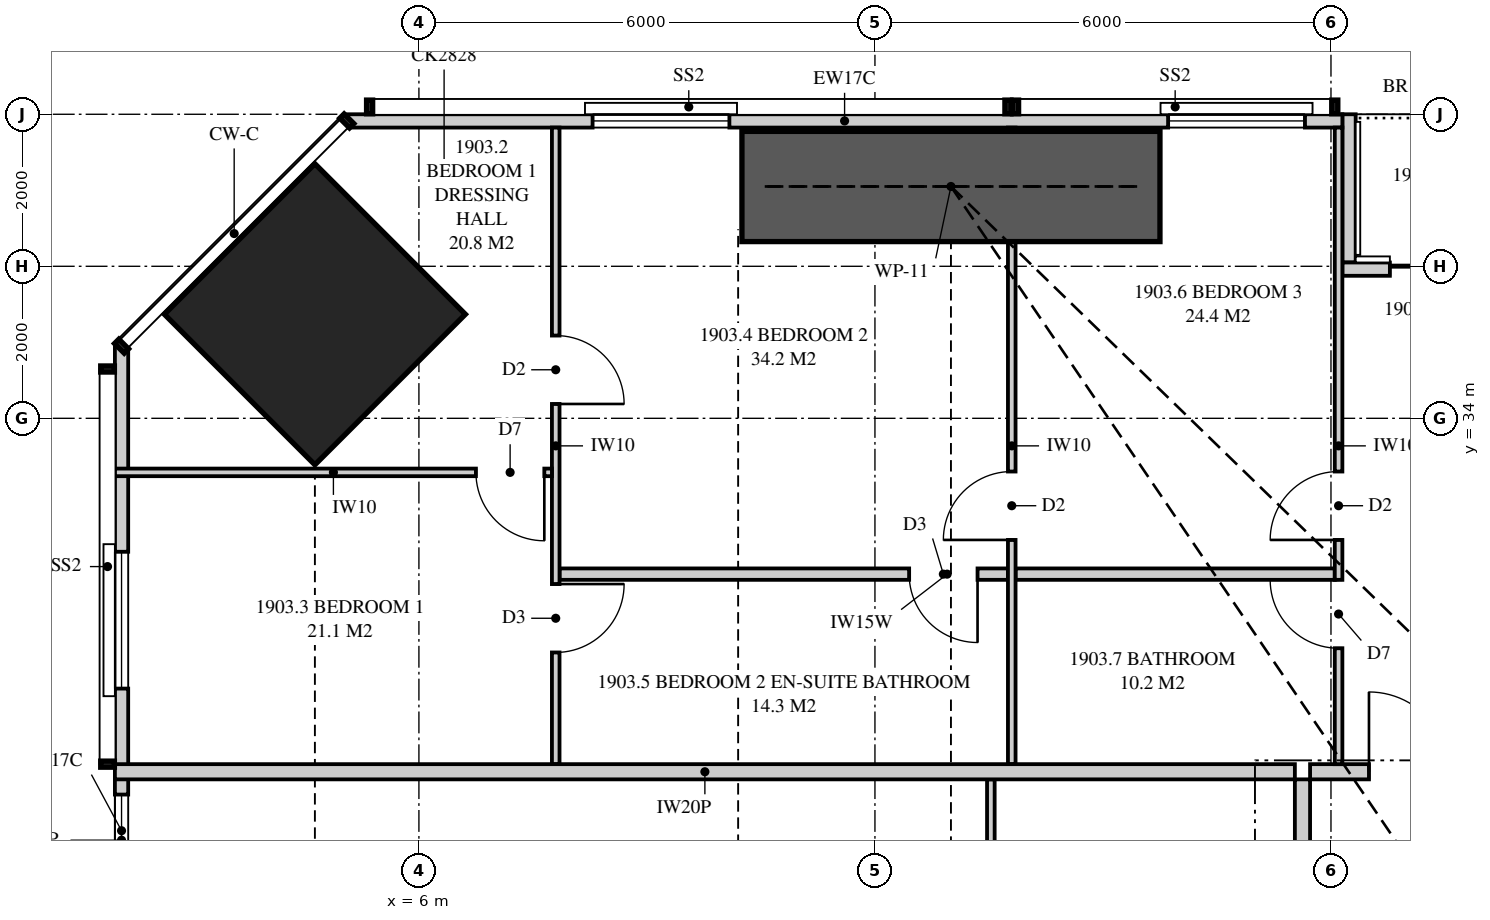
"""IFC4 building model, lengths in metres.
Left out: names, types, materials, properties, quantities, classifications, styles, units other than length and angle.
Written with IfcOpenShell. Run it as: python <this file> out.ifc"""

import sys

from ifc_helpers import new_model, si_unit, direction, frame, frame_2d, origin, origin_2d, place, context, subcontext, project, spatial, polyline, rectangle, hollow_rectangle, outline, extrude, element, fill, save


model = new_model("IFC4")
c1 = context("Model", 3, precision=1e-05, world=origin(), true_north=direction((0.0, 1.0)))
c2 = subcontext(c1, "Body", "Model", "MODEL_VIEW")
j1 = project(units=[si_unit("LENGTHUNIT", "METRE"), si_unit("PLANEANGLEUNIT", "RADIAN")], contexts=[c1])
p1 = place(None, origin())
s1 = spatial("IfcSite", under=j1, at=p1, CompositionType="ELEMENT")
p2 = place(p1, origin())
s2 = spatial("IfcBuilding", under=s1, at=p2, CompositionType="ELEMENT")
p3 = place(p2, frame((0.0, 0.0, 71.25)))
s3 = spatial("IfcBuildingStorey", under=s2, at=p3, CompositionType="ELEMENT", Elevation=71.25)
p4 = place(p3, frame((4.631, 35.369, 0.0), z_axis=(0.0, 0.0, 1.0), x_axis=(0.707106781187, -0.707106781187, 0.0)))
e1 = element("IfcColumn", 1, at=p4, inside=s3, PredefinedType="COLUMN", context=c2, shape_type="SweptSolid", body=[
    extrude(hollow_rectangle(XDim=2.8, YDim=2.8, WallThickness=0.175, at=origin_2d()), origin(), (0.0, 0.0, 1.0), 3.5),
])
p5 = place(p3, frame((18.15, 37.913, 0.0), z_axis=(0.0, 0.0, 1.0), x_axis=(-1.0, 0.0, 0.0)))
e2 = element("IfcWall", 2, at=p5, inside=s3, PredefinedType="SOLIDWALL", context=c2, shape_type="SweptSolid", body=[
    extrude(rectangle(XDim=13.099, YDim=0.175, at=frame_2d((6.549, 0.0))), origin(), (0.0, 0.0, 1.0), 3.22),
])
p6 = place(p5, frame((0.492, 0.0, 0.4)))
e3 = element("IfcOpeningElement", 3, at=p6, cuts=e2, PredefinedType="OPENING", context=c2, shape_type="SweptSolid", body=[
    extrude(rectangle(XDim=1.8, YDim=1.85, at=frame_2d((0.9, 0.925))), frame((0.0, 0.097, 0.0), z_axis=(0.0, -1.0, 0.0), x_axis=(1.0, 0.0, 0.0)), (0.0, 0.0, 1.0), 0.195),
])
p7 = place(p5, frame((8.065, 0.0, 0.4)))
e4 = element("IfcOpeningElement", 4, at=p7, cuts=e2, PredefinedType="OPENING", context=c2, shape_type="SweptSolid", body=[
    extrude(rectangle(XDim=1.8, YDim=1.85, at=frame_2d((0.9, 0.925))), frame((0.0, 0.097, 0.0), z_axis=(0.0, -1.0, 0.0), x_axis=(1.0, 0.0, 0.0)), (0.0, 0.0, 1.0), 0.195),
])
p8 = place(p3, frame((21.2, 35.962, 0.0), z_axis=(0.0, 0.0, 1.0), x_axis=(-1.0, 0.0, 0.0)))
e5 = element("IfcWall", 5, at=p8, inside=s3, PredefinedType="SOLIDWALL", context=c2, shape_type="SweptSolid", body=[
    extrude(rectangle(XDim=3.05, YDim=0.175, at=frame_2d((1.525, 0.0))), origin(), (0.0, 0.0, 1.0), 3.22),
])
p9 = place(p8, frame((0.625, 0.0, 0.0)))
e6 = element("IfcOpeningElement", 6, at=p9, cuts=e5, PredefinedType="OPENING", context=c2, shape_type="SweptSolid", body=[
    extrude(rectangle(XDim=1.8, YDim=2.25, at=frame_2d((0.9, 1.125))), frame((0.0, 0.097, 0.0), z_axis=(0.0, -1.0, 0.0), x_axis=(1.0, 0.0, 0.0)), (0.0, 0.0, 1.0), 0.195),
])
p10 = place(p3, frame((18.238, 38.0, 0.0), z_axis=(0.0, 0.0, 1.0), x_axis=(0.0, -1.0, 0.0)))
e7 = element("IfcWall", 7, at=p10, inside=s3, PredefinedType="SOLIDWALL", context=c2, shape_type="SweptSolid", body=[
    extrude(outline(polyline([(0.0, 0.0), (1.95, 0.0), (1.95, 3.22), (1.65, 3.22), (1.65, 2.1), (0.25, 2.1), (0.25, 3.22), (0.0, 3.22), (0.0, 0.0)])), frame((0.0, 0.087, 0.0), z_axis=(0.0, -1.0, 0.0), x_axis=(1.0, 0.0, 0.0)), (0.0, 0.0, 1.0), 0.175),
])
p11 = place(p3, frame((2.087, 34.949, 0.0), z_axis=(0.0, 0.0, 1.0), x_axis=(0.0, -1.0, 0.0)))
e8 = element("IfcWall", 8, at=p11, inside=s3, PredefinedType="SOLIDWALL", context=c2, shape_type="SweptSolid", body=[
    extrude(rectangle(XDim=12.749, YDim=0.175, at=frame_2d((6.375, 0.0))), origin(), (0.0, 0.0, 1.0), 3.22),
])
p12 = place(p11, frame((2.704, 0.0, 0.4)))
e9 = element("IfcOpeningElement", 9, at=p12, cuts=e8, PredefinedType="OPENING", context=c2, shape_type="SweptSolid", body=[
    extrude(rectangle(XDim=1.8, YDim=1.85, at=frame_2d((0.9, 0.925))), frame((0.0, 0.097, 0.0), z_axis=(0.0, -1.0, 0.0), x_axis=(1.0, 0.0, 0.0)), (0.0, 0.0, 1.0), 0.195),
])
p13 = place(p11, frame((5.899, 0.0, 0.4)))
e10 = element("IfcOpeningElement", 10, at=p13, cuts=e8, PredefinedType="OPENING", context=c2, shape_type="SweptSolid", body=[
    extrude(rectangle(XDim=1.2, YDim=1.85, at=frame_2d((0.6, 0.925))), frame((0.0, 0.097, 0.0), z_axis=(0.0, -1.0, 0.0), x_axis=(1.0, 0.0, 0.0)), (0.0, 0.0, 1.0), 0.195),
])
p14 = place(p3, frame((17.725, 29.35, 0.0), z_axis=(0.0, 0.0, 1.0), x_axis=(1.0, 0.0, 0.0)))
e11 = element("IfcWall", 11, at=p14, inside=s3, PredefinedType="PARTITIONING", context=c2, shape_type="SweptSolid", body=[
    extrude(outline(polyline([(0.0, 0.0), (7.075, 0.0), (7.075, 3.22), (6.564, 3.22), (6.564, 2.694), (5.986, 2.694), (5.986, 3.22), (3.641, 3.22), (3.641, 2.641), (2.757, 2.641), (2.757, 3.22), (0.862, 3.22), (0.862, 2.641), (0.155, 2.641), (0.155, 3.22), (0.0, 3.22), (0.0, 0.0)])), frame((0.0, 0.1, 0.0), z_axis=(0.0, -1.0, 0.0), x_axis=(1.0, 0.0, 0.0)), (0.0, 0.0, 1.0), 0.2),
])
p15 = place(p14, frame((0.775, 0.0, 0.0)))
e12 = element("IfcOpeningElement", 12, at=p15, cuts=e11, PredefinedType="OPENING", context=c2, shape_type="SweptSolid", body=[
    extrude(rectangle(XDim=1.05, YDim=2.2, at=frame_2d((0.525, 1.1))), frame((0.0, 0.11, 0.0), z_axis=(0.0, -1.0, 0.0), x_axis=(1.0, 0.0, 0.0)), (0.0, 0.0, 1.0), 0.22),
])
p16 = place(p3, frame((7.8, 37.825, 0.0), z_axis=(0.0, 0.0, 1.0), x_axis=(0.0, -1.0, 0.0)))
e13 = element("IfcWall", 13, at=p16, inside=s3, PredefinedType="PARTITIONING", context=c2, shape_type="SweptSolid", body=[
    extrude(outline(polyline([(0.0, 0.0), (8.375, 0.0), (8.375, 3.22), (2.544, 3.22), (2.544, 2.1), (1.096, 2.1), (1.096, 3.22), (0.0, 3.22), (0.0, 0.0)])), frame((0.0, 0.05, 0.0), z_axis=(0.0, -1.0, 0.0), x_axis=(1.0, 0.0, 0.0)), (0.0, 0.0, 1.0), 0.1),
])
p17 = place(p16, frame((2.736, 0.0, 0.0)))
e14 = element("IfcOpeningElement", 14, at=p17, cuts=e13, PredefinedType="OPENING", context=c2, shape_type="SweptSolid", body=[
    extrude(rectangle(XDim=0.9, YDim=2.1, at=frame_2d((0.45, 1.05))), frame((0.0, 0.06, 0.0), z_axis=(0.0, -1.0, 0.0), x_axis=(1.0, 0.0, 0.0)), (0.0, 0.0, 1.0), 0.12),
])
p18 = place(p16, frame((6.006, 0.0, 0.0)))
e15 = element("IfcOpeningElement", 15, at=p18, cuts=e13, PredefinedType="OPENING", context=c2, shape_type="SweptSolid", body=[
    extrude(rectangle(XDim=0.9, YDim=2.1, at=frame_2d((0.45, 1.05))), frame((0.0, 0.06, 0.0), z_axis=(0.0, -1.0, 0.0), x_axis=(1.0, 0.0, 0.0)), (0.0, 0.0, 1.0), 0.12),
])
p19 = place(p3, frame((13.8, 37.825, 0.0), z_axis=(0.0, 0.0, 1.0), x_axis=(0.0, -1.0, 0.0)))
e16 = element("IfcWall", 16, at=p19, inside=s3, PredefinedType="PARTITIONING", context=c2, shape_type="SweptSolid", body=[
    extrude(outline(polyline([(8.375, 0.0), (8.375, 3.22), (2.446, 3.22), (2.446, 2.641), (1.485, 2.641), (1.485, 2.319), (1.475, 2.319), (1.475, 2.1), (1.021, 2.1), (1.021, 1.32), (0.529, 1.32), (0.529, 2.1), (0.075, 2.1), (0.075, 2.319), (0.0, 2.319), (0.0, 0.0), (8.375, 0.0)]), holes=[polyline([(0.529, 0.177), (0.529, 0.98), (1.021, 0.98), (1.021, 0.177), (0.529, 0.177)])]), frame((0.0, 0.05, 0.0), z_axis=(0.0, -1.0, 0.0), x_axis=(1.0, 0.0, 0.0)), (0.0, 0.0, 1.0), 0.1),
])
p20 = place(p19, frame((4.525, 0.0, 0.0)))
e17 = element("IfcOpeningElement", 17, at=p20, cuts=e16, PredefinedType="OPENING", context=c2, shape_type="SweptSolid", body=[
    extrude(rectangle(XDim=0.9, YDim=2.1, at=frame_2d((0.45, 1.05))), frame((0.0, 0.06, 0.0), z_axis=(0.0, -1.0, 0.0), x_axis=(1.0, 0.0, 0.0)), (0.0, 0.0, 1.0), 0.12),
])
p21 = place(p3, frame((18.1, 37.825, 0.0), z_axis=(0.0, 0.0, 1.0), x_axis=(0.0, -1.0, 0.0)))
e18 = element("IfcWall", 18, at=p21, inside=s3, PredefinedType="PARTITIONING", context=c2, shape_type="SweptSolid", body=[
    extrude(outline(polyline([(0.0, 0.0), (8.375, 0.0), (8.375, 2.641), (7.785, 2.641), (7.785, 3.22), (6.109, 3.22), (6.109, 2.641), (5.353, 2.641), (5.353, 3.22), (1.475, 3.22), (1.475, 2.1), (0.075, 2.1), (0.075, 3.22), (0.0, 3.22), (0.0, 0.0)])), frame((0.0, 0.05, 0.0), z_axis=(0.0, -1.0, 0.0), x_axis=(1.0, 0.0, 0.0)), (0.0, 0.0, 1.0), 0.1),
])
p22 = place(p21, frame((4.525, 0.0, 0.0)))
e19 = element("IfcOpeningElement", 19, at=p22, cuts=e18, PredefinedType="OPENING", context=c2, shape_type="SweptSolid", body=[
    extrude(rectangle(XDim=0.9, YDim=2.1, at=frame_2d((0.45, 1.05))), frame((0.0, 0.06, 0.0), z_axis=(0.0, -1.0, 0.0), x_axis=(1.0, 0.0, 0.0)), (0.0, 0.0, 1.0), 0.12),
])
p23 = place(p21, frame((5.95, 0.0, 0.0)))
e20 = element("IfcOpeningElement", 20, at=p23, cuts=e18, PredefinedType="OPENING", context=c2, shape_type="SweptSolid", body=[
    extrude(rectangle(XDim=0.9, YDim=2.1, at=frame_2d((0.45, 1.05))), frame((0.0, 0.06, 0.0), z_axis=(0.0, -1.0, 0.0), x_axis=(1.0, 0.0, 0.0)), (0.0, 0.0, 1.0), 0.12),
])
p24 = place(p3, frame((2.0, 33.289, 0.0), z_axis=(0.0, 0.0, 1.0), x_axis=(1.0, 0.0, 0.0)))
e21 = element("IfcWall", 21, at=p24, inside=s3, PredefinedType="PARTITIONING", context=c2, shape_type="SweptSolid", body=[
    extrude(outline(polyline([(0.0, 0.0), (5.75, 0.0), (5.75, 3.22), (3.011, 3.22), (3.011, 2.1), (1.577, 2.1), (1.577, 3.22), (0.0, 3.22), (0.0, 0.0)])), frame((0.0, 0.05, 0.0), z_axis=(0.0, -1.0, 0.0), x_axis=(1.0, 0.0, 0.0)), (0.0, 0.0, 1.0), 0.1),
])
p25 = place(p24, frame((4.75, 0.0, 0.0)))
e22 = element("IfcOpeningElement", 22, at=p25, cuts=e21, PredefinedType="OPENING", context=c2, shape_type="SweptSolid", body=[
    extrude(rectangle(XDim=0.9, YDim=2.1, at=frame_2d((0.45, 1.05))), frame((0.0, 0.06, 0.0), z_axis=(0.0, -1.0, 0.0), x_axis=(1.0, 0.0, 0.0)), (0.0, 0.0, 1.0), 0.12),
])
p26 = place(p3, frame((7.85, 31.95, 0.0), z_axis=(0.0, 0.0, 1.0), x_axis=(1.0, 0.0, 0.0)))
e23 = element("IfcWall", 23, at=p26, inside=s3, PredefinedType="PLUMBINGWALL", context=c2, shape_type="SweptSolid", body=[
    extrude(outline(polyline([(0.0, 0.0), (5.9, 0.0), (5.9, 3.22), (5.474, 3.22), (5.474, 2.621), (4.826, 2.621), (4.826, 3.22), (3.635, 3.22), (3.635, 2.62), (1.065, 2.62), (1.065, 3.22), (0.0, 3.22), (0.0, 0.0)])), frame((0.0, 0.075, 0.0), z_axis=(0.0, -1.0, 0.0), x_axis=(1.0, 0.0, 0.0)), (0.0, 0.0, 1.0), 0.15),
])
p27 = place(p26, frame((4.6, 0.0, 0.0)))
e24 = element("IfcOpeningElement", 24, at=p27, cuts=e23, PredefinedType="OPENING", context=c2, shape_type="SweptSolid", body=[
    extrude(rectangle(XDim=0.9, YDim=2.1, at=frame_2d((0.45, 1.05))), frame((0.0, 0.085, 0.0), z_axis=(0.0, -1.0, 0.0), x_axis=(1.0, 0.0, 0.0)), (0.0, 0.0, 1.0), 0.17),
])
p28 = place(p3, frame((13.85, 31.95, 0.0), z_axis=(0.0, 0.0, 1.0), x_axis=(1.0, 0.0, 0.0)))
e25 = element("IfcWall", 25, at=p28, inside=s3, PredefinedType="PLUMBINGWALL", context=c2, shape_type="SweptSolid", body=[
    extrude(outline(polyline([(0.0, 0.0), (4.2, 0.0), (4.2, 2.641), (3.982, 2.641), (3.982, 3.22), (2.953, 3.22), (2.953, 2.641), (2.28, 2.641), (2.28, 3.22), (0.0, 3.22), (0.0, 0.0)])), frame((0.0, 0.075, 0.0), z_axis=(0.0, -1.0, 0.0), x_axis=(1.0, 0.0, 0.0)), (0.0, 0.0, 1.0), 0.15),
])
p29 = place(p3, frame((2.0, 29.35, 0.0), z_axis=(0.0, 0.0, 1.0), x_axis=(1.0, 0.0, 0.0)))
e26 = element("IfcWall", 26, at=p29, inside=s3, PredefinedType="PARTITIONING", context=c2, shape_type="SweptSolid", body=[
    extrude(outline(polyline([(0.0, 0.0), (15.525, 0.0), (15.525, 3.22), (11.349, 3.22), (11.349, 2.621), (10.651, 2.621), (10.651, 3.22), (9.51, 3.22), (9.51, 2.62), (6.89, 2.62), (6.89, 3.22), (2.98, 3.22), (2.98, 2.621), (2.381, 2.621), (2.381, 2.1), (0.93, 2.1), (0.93, 3.22), (0.0, 3.22), (0.0, 0.0)])), frame((0.0, 0.1, 0.0), z_axis=(0.0, -1.0, 0.0), x_axis=(1.0, 0.0, 0.0)), (0.0, 0.0, 1.0), 0.2),
])
p30 = place(p3, frame((17.625, 14.1, 0.0), z_axis=(0.0, 0.0, 1.0), x_axis=(0.0, 1.0, 0.0)))
e27 = element("IfcWall", 27, at=p30, inside=s3, PredefinedType="PARTITIONING", context=c2, shape_type="SweptSolid", body=[
    extrude(outline(polyline([(0.0, 0.0), (15.15, 0.0), (15.15, 3.22), (11.4, 3.22), (11.4, 2.22), (10.4, 2.22), (10.4, 3.22), (0.0, 3.22), (0.0, 0.0)])), frame((0.0, 0.1, 0.0), z_axis=(0.0, -1.0, 0.0), x_axis=(1.0, 0.0, 0.0)), (0.0, 0.0, 1.0), 0.2),
])
p31 = place(p30, frame((7.075, 0.0, 0.0)))
e28 = element("IfcOpeningElement", 28, at=p31, cuts=e27, PredefinedType="OPENING", context=c2, shape_type="SweptSolid", body=[
    extrude(rectangle(XDim=1.05, YDim=2.2, at=frame_2d((0.525, 1.1))), frame((0.0, 0.11, 0.0), z_axis=(0.0, -1.0, 0.0), x_axis=(1.0, 0.0, 0.0)), (0.0, 0.0, 1.0), 0.22),
])
p32 = place(p3, frame((13.525, 18.15, 0.0), z_axis=(0.0, 0.0, 1.0), x_axis=(0.0, 1.0, 0.0)))
e29 = element("IfcWall", 29, at=p32, inside=s3, PredefinedType="PARTITIONING", context=c2, shape_type="SweptSolid", body=[
    extrude(outline(polyline([(0.0, 0.0), (11.1, 0.0), (11.1, 3.22), (7.35, 3.22), (7.35, 2.22), (6.35, 2.22), (6.35, 3.22), (0.0, 3.22), (0.0, 0.0)])), frame((0.0, 0.05, 0.0), z_axis=(0.0, -1.0, 0.0), x_axis=(1.0, 0.0, 0.0)), (0.0, 0.0, 1.0), 0.1),
])
p33 = place(p32, frame((3.025, 0.0, 0.0)))
e30 = element("IfcOpeningElement", 30, at=p33, cuts=e29, PredefinedType="OPENING", context=c2, shape_type="SweptSolid", body=[
    extrude(rectangle(XDim=1.0, YDim=2.1, at=frame_2d((0.5, 1.05))), frame((0.0, 0.06, 0.0), z_axis=(0.0, -1.0, 0.0), x_axis=(1.0, 0.0, 0.0)), (0.0, 0.0, 1.0), 0.12),
])
p34 = place(p3, frame((10.25, 37.05, 0.0), z_axis=(0.0, 0.0, 1.0), x_axis=(1.0, 0.0, 0.0)))
e31 = element("IfcWall", 31, at=p34, inside=s3, PredefinedType="SHEAR", context=c2, shape_type="SweptSolid", body=[
    extrude(rectangle(XDim=5.5, YDim=1.45, at=frame_2d((2.75, 0.0))), origin(), (0.0, 0.0, 1.0), 3.5),
])
p35 = place(p9, origin())
e32 = element("IfcDoor", 32, at=p35, inside=s3, OperationType="SLIDING_TO_LEFT", PredefinedType="DOOR", context=c2, shape_type="SweptSolid", body=[
    extrude(rectangle(XDim=1.8, YDim=2.25, at=frame_2d((0.9, 1.125))), frame((0.0, 0.025, 0.0), z_axis=(0.0, -1.0, 0.0), x_axis=(1.0, 0.0, 0.0)), (0.0, 0.0, 1.0), 0.05),
])
fill(e6, e32)
p36 = place(p6, origin())
e33 = element("IfcWindow", 33, at=p36, inside=s3, PartitioningType="SINGLE_PANEL", PredefinedType="WINDOW", context=c2, shape_type="SweptSolid", body=[
    extrude(rectangle(XDim=1.8, YDim=1.85, at=frame_2d((0.9, 0.925))), frame((0.0, 0.03, 0.0), z_axis=(0.0, -1.0, 0.0), x_axis=(1.0, 0.0, 0.0)), (0.0, 0.0, 1.0), 0.06),
])
fill(e3, e33)
p37 = place(p7, origin())
e34 = element("IfcWindow", 34, at=p37, inside=s3, PartitioningType="SINGLE_PANEL", PredefinedType="WINDOW", context=c2, shape_type="SweptSolid", body=[
    extrude(rectangle(XDim=1.8, YDim=1.85, at=frame_2d((0.9, 0.925))), frame((0.0, 0.03, 0.0), z_axis=(0.0, -1.0, 0.0), x_axis=(1.0, 0.0, 0.0)), (0.0, 0.0, 1.0), 0.06),
])
fill(e4, e34)
p38 = place(p12, origin())
e35 = element("IfcWindow", 35, at=p38, inside=s3, PartitioningType="SINGLE_PANEL", PredefinedType="WINDOW", context=c2, shape_type="SweptSolid", body=[
    extrude(rectangle(XDim=1.8, YDim=1.85, at=frame_2d((0.9, 0.925))), frame((0.0, 0.03, 0.0), z_axis=(0.0, -1.0, 0.0), x_axis=(1.0, 0.0, 0.0)), (0.0, 0.0, 1.0), 0.06),
])
fill(e9, e35)
p39 = place(p13, origin())
e36 = element("IfcWindow", 36, at=p39, inside=s3, PartitioningType="SINGLE_PANEL", PredefinedType="WINDOW", context=c2, shape_type="SweptSolid", body=[
    extrude(rectangle(XDim=1.2, YDim=1.85, at=frame_2d((0.6, 0.925))), frame((0.0, 0.03, 0.0), z_axis=(0.0, -1.0, 0.0), x_axis=(1.0, 0.0, 0.0)), (0.0, 0.0, 1.0), 0.06),
])
fill(e10, e36)
p40 = place(p15, origin())
e37 = element("IfcDoor", 37, at=p40, inside=s3, OperationType="SINGLE_SWING_LEFT", PredefinedType="DOOR", context=c2, shape_type="SweptSolid", body=[
    extrude(rectangle(XDim=1.05, YDim=2.2, at=frame_2d((0.525, 1.1))), frame((0.0, 0.025, 0.0), z_axis=(0.0, -1.0, 0.0), x_axis=(1.0, 0.0, 0.0)), (0.0, 0.0, 1.0), 0.05),
])
fill(e12, e37)
p41 = place(p25, frame((0.9, 0.0, 0.0), z_axis=(0.0, 0.0, 1.0), x_axis=(-1.0, 0.0, 0.0)))
e38 = element("IfcDoor", 38, at=p41, inside=s3, OperationType="SINGLE_SWING_LEFT", PredefinedType="DOOR", context=c2, shape_type="SweptSolid", body=[
    extrude(rectangle(XDim=0.9, YDim=2.1, at=frame_2d((0.45, 1.05))), frame((0.0, 0.025, 0.0), z_axis=(0.0, -1.0, 0.0), x_axis=(1.0, 0.0, 0.0)), (0.0, 0.0, 1.0), 0.05),
])
fill(e22, e38)
p42 = place(p17, origin())
e39 = element("IfcDoor", 39, at=p42, inside=s3, OperationType="SINGLE_SWING_RIGHT", PredefinedType="DOOR", context=c2, shape_type="SweptSolid", body=[
    extrude(rectangle(XDim=0.9, YDim=2.1, at=frame_2d((0.45, 1.05))), frame((0.0, 0.025, 0.0), z_axis=(0.0, -1.0, 0.0), x_axis=(1.0, 0.0, 0.0)), (0.0, 0.0, 1.0), 0.05),
])
fill(e14, e39)
p43 = place(p20, frame((0.9, 0.0, 0.0), z_axis=(0.0, 0.0, 1.0), x_axis=(-1.0, 0.0, 0.0)))
e40 = element("IfcDoor", 40, at=p43, inside=s3, OperationType="SINGLE_SWING_LEFT", PredefinedType="DOOR", context=c2, shape_type="SweptSolid", body=[
    extrude(rectangle(XDim=0.9, YDim=2.1, at=frame_2d((0.45, 1.05))), frame((0.0, 0.025, 0.0), z_axis=(0.0, -1.0, 0.0), x_axis=(1.0, 0.0, 0.0)), (0.0, 0.0, 1.0), 0.05),
])
fill(e17, e40)
p44 = place(p27, frame((0.9, 0.0, 0.0), z_axis=(0.0, 0.0, 1.0), x_axis=(-1.0, 0.0, 0.0)))
e41 = element("IfcDoor", 41, at=p44, inside=s3, OperationType="SINGLE_SWING_LEFT", PredefinedType="DOOR", context=c2, shape_type="SweptSolid", body=[
    extrude(rectangle(XDim=0.9, YDim=2.1, at=frame_2d((0.45, 1.05))), frame((0.0, 0.025, 0.0), z_axis=(0.0, -1.0, 0.0), x_axis=(1.0, 0.0, 0.0)), (0.0, 0.0, 1.0), 0.05),
])
fill(e24, e41)
p45 = place(p22, frame((0.9, 0.0, 0.0), z_axis=(0.0, 0.0, 1.0), x_axis=(-1.0, 0.0, 0.0)))
e42 = element("IfcDoor", 42, at=p45, inside=s3, OperationType="SINGLE_SWING_LEFT", PredefinedType="DOOR", context=c2, shape_type="SweptSolid", body=[
    extrude(rectangle(XDim=0.9, YDim=2.1, at=frame_2d((0.45, 1.05))), frame((0.0, 0.025, 0.0), z_axis=(0.0, -1.0, 0.0), x_axis=(1.0, 0.0, 0.0)), (0.0, 0.0, 1.0), 0.05),
])
fill(e19, e42)
p46 = place(p23, frame((0.9, 0.0, 0.0), z_axis=(0.0, 0.0, 1.0), x_axis=(-1.0, 0.0, 0.0)))
e43 = element("IfcDoor", 43, at=p46, inside=s3, OperationType="SINGLE_SWING_RIGHT", PredefinedType="DOOR", context=c2, shape_type="SweptSolid", body=[
    extrude(rectangle(XDim=0.9, YDim=2.1, at=frame_2d((0.45, 1.05))), frame((0.0, 0.025, 0.0), z_axis=(0.0, -1.0, 0.0), x_axis=(1.0, 0.0, 0.0)), (0.0, 0.0, 1.0), 0.05),
])
fill(e20, e43)
p47 = place(p18, origin())
e44 = element("IfcDoor", 44, at=p47, inside=s3, OperationType="SINGLE_SWING_LEFT", PredefinedType="DOOR", context=c2, shape_type="SweptSolid", body=[
    extrude(rectangle(XDim=0.9, YDim=2.1, at=frame_2d((0.45, 1.05))), frame((0.0, 0.025, 0.0), z_axis=(0.0, -1.0, 0.0), x_axis=(1.0, 0.0, 0.0)), (0.0, 0.0, 1.0), 0.05),
])
fill(e15, e44)
save(model, sys.argv[1])
